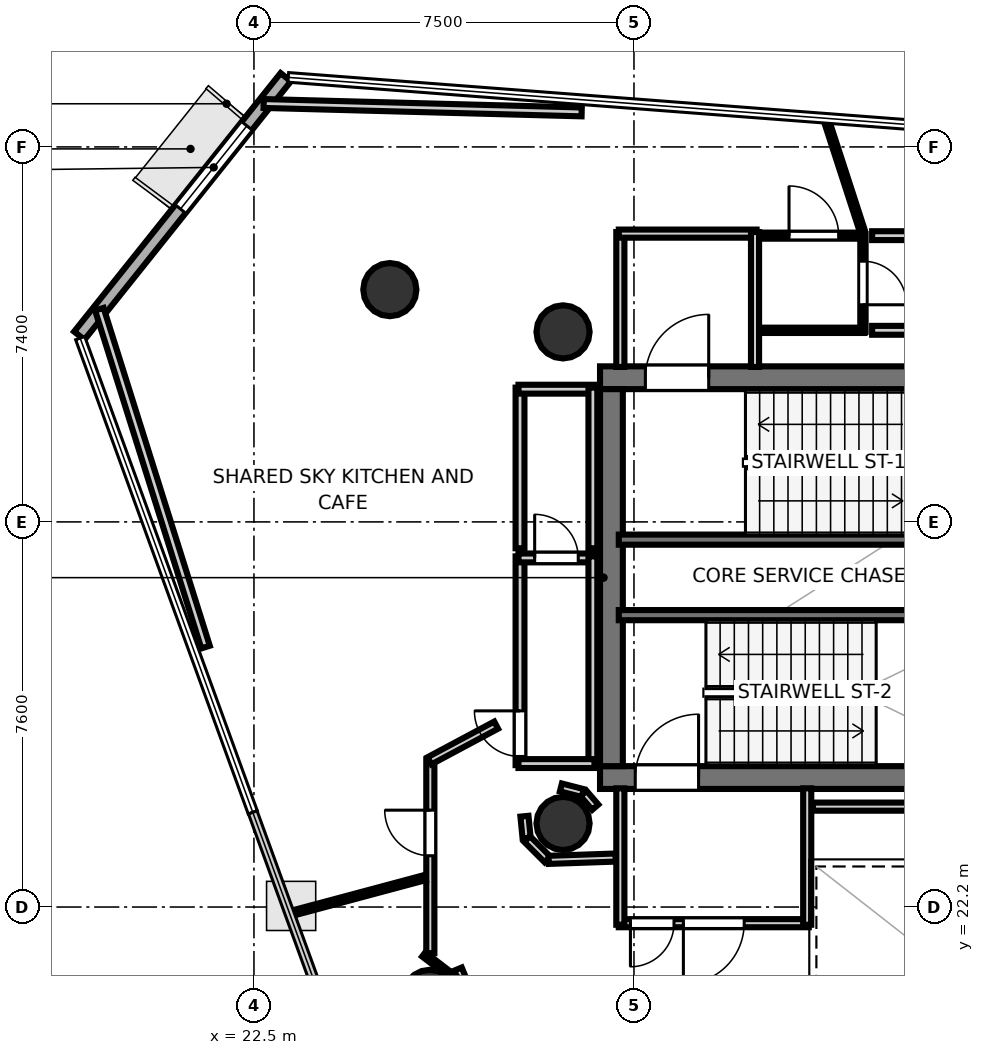
"""IFC4 building model, lengths in metres.
Left out: names, types, materials, properties, quantities, classifications, styles, units other than length and angle.
Written with IfcOpenShell. Run it as: python <this file> out.ifc"""

import sys

from ifc_helpers import new_model, si_unit, direction, frame, frame_2d, origin, origin_2d, place, context, subcontext, project, spatial, rectangle, hollow_circle, extrude, element, fill, save


model = new_model("IFC4")
c1 = context("Model", 3, precision=1e-05, world=origin(), true_north=direction((0.0, 1.0)))
c2 = subcontext(c1, "Body", "Model", "MODEL_VIEW")
j1 = project(units=[si_unit("LENGTHUNIT", "METRE"), si_unit("PLANEANGLEUNIT", "RADIAN")], contexts=[c1])
p1 = place(None, origin())
s1 = spatial("IfcSite", under=j1, at=p1, CompositionType="ELEMENT")
p2 = place(p1, origin())
s2 = spatial("IfcBuilding", under=s1, at=p2, CompositionType="ELEMENT")
p3 = place(p2, frame((0.0, 0.0, 234.5)))
s3 = spatial("IfcBuildingStorey", under=s2, at=p3, CompositionType="ELEMENT", Elevation=234.5)
p4 = place(p3, frame((29.33, 32.645, 0.0), z_axis=(0.0, 0.0, 1.0), x_axis=(1.0, 0.0, 0.0)))
e1 = element("IfcWall", 1, at=p4, inside=s3, PredefinedType="SHEAR", context=c2, shape_type="SweptSolid", body=[
    extrude(rectangle(XDim=10.52, YDim=0.45, at=frame_2d((5.26, 0.0))), origin(), (0.0, 0.0, 1.0), 4.32),
])
p5 = place(p4, frame((0.895, 0.0, 0.0)))
e2 = element("IfcOpeningElement", 2, at=p5, cuts=e1, PredefinedType="OPENING", context=c2, shape_type="SweptSolid", body=[
    extrude(rectangle(XDim=1.25, YDim=2.15, at=frame_2d((0.625, 1.075))), frame((0.0, 0.235, 0.0), z_axis=(0.0, -1.0, 0.0), x_axis=(1.0, 0.0, 0.0)), (0.0, 0.0, 1.0), 0.47),
])
p6 = place(p3, frame((29.33, 24.755, 0.0), z_axis=(0.0, 0.0, 1.0), x_axis=(1.0, 0.0, 0.0)))
e3 = element("IfcWall", 3, at=p6, inside=s3, PredefinedType="SHEAR", context=c2, shape_type="SweptSolid", body=[
    extrude(rectangle(XDim=10.52, YDim=0.45, at=frame_2d((5.26, 0.0))), origin(), (0.0, 0.0, 1.0), 4.32),
])
p7 = place(p6, frame((0.695, 0.0, 0.0)))
e4 = element("IfcOpeningElement", 4, at=p7, cuts=e3, PredefinedType="OPENING", context=c2, shape_type="SweptSolid", body=[
    extrude(rectangle(XDim=1.25, YDim=2.15, at=frame_2d((0.625, 1.075))), frame((0.0, 0.235, 0.0), z_axis=(0.0, -1.0, 0.0), x_axis=(1.0, 0.0, 0.0)), (0.0, 0.0, 1.0), 0.47),
])
p8 = place(p3, frame((29.555, 24.98, 0.0), z_axis=(0.0, 0.0, 1.0), x_axis=(0.0, 1.0, 0.0)))
e5 = element("IfcWall", 5, at=p8, inside=s3, PredefinedType="SHEAR", context=c2, shape_type="SweptSolid", body=[
    extrude(rectangle(XDim=7.44, YDim=0.45, at=frame_2d((3.72, 0.0))), origin(), (0.0, 0.0, 1.0), 4.32),
])
for number, where, z_axis, x_axis in (
    (6, (28.6, 33.55, 0.0), (0.0, 0.0, 1.0), (1.0, 0.0, 0.0)),
    (7, (28.6, 23.85, 0.0), (0.0, 0.0, 1.0), (1.0, 0.0, 0.0)),
):
    element("IfcColumn", number, at=place(p3, frame(where, z_axis=z_axis, x_axis=x_axis)), inside=s3, PredefinedType="COLUMN", context=c2, shape_type="SweptSolid", body=[
        extrude(hollow_circle(Radius=0.525, WallThickness=0.028, at=origin_2d()), origin(), (0.0, 0.0, 1.0), 4.5),
    ])
for number, where, z_axis, x_axis in (
    (8, (25.182, 34.384, -0.27), (0.0, 0.0, 1.0), (1.0, 0.0, 0.0)),
    (9, (25.972, 20.437, -0.27), (0.0, 0.0, 1.0), (1.0, 0.0, 0.0)),
):
    element("IfcColumn", number, at=place(p3, frame(where, z_axis=z_axis, x_axis=x_axis)), inside=s3, PredefinedType="COLUMN", context=c2, shape_type="SweptSolid", body=[
        extrude(hollow_circle(Radius=0.525, WallThickness=0.028, at=origin_2d()), origin(), (0.0, 0.0, 1.0), 4.77),
    ])
p9 = place(p3, frame((23.127, 38.576, 0.0), z_axis=(0.0, 0.0, 1.0), x_axis=(-0.624042741738, -0.781390207568, 0.0)))
e10 = element("IfcWall", 10, at=p9, inside=s3, PredefinedType="SOLIDWALL", context=c2, shape_type="SweptSolid", body=[
    extrude(rectangle(XDim=6.529, YDim=0.26, at=frame_2d((3.265, 0.0))), origin(), (0.0, 0.0, 1.0), 4.32),
])
p10 = place(p9, frame((1.229, 0.0, 0.85)))
e11 = element("IfcOpeningElement", 11, at=p10, cuts=e10, PredefinedType="OPENING", context=c2, shape_type="SweptSolid", body=[
    extrude(rectangle(XDim=2.1, YDim=2.2, at=frame_2d((1.05, 1.1))), frame((0.0, 0.14, 0.0), z_axis=(0.0, -1.0, 0.0), x_axis=(1.0, 0.0, 0.0)), (0.0, 0.0, 1.0), 0.28),
])
p11 = place(p3, frame((29.7, 29.45, 0.0), z_axis=(0.0, 0.0, 1.0), x_axis=(1.0, 0.0, 0.0)))
e12 = element("IfcWall", 12, at=p11, inside=s3, PredefinedType="SOLIDWALL", context=c2, shape_type="SweptSolid", body=[
    extrude(rectangle(XDim=8.3, YDim=0.2, at=frame_2d((4.15, 0.0))), origin(), (0.0, 0.0, 1.0), 4.32),
])
p12 = place(p3, frame((29.7, 27.96, 0.0), z_axis=(0.0, 0.0, 1.0), x_axis=(1.0, 0.0, 0.0)))
e13 = element("IfcWall", 13, at=p12, inside=s3, PredefinedType="SOLIDWALL", context=c2, shape_type="SweptSolid", body=[
    extrude(rectangle(XDim=7.75, YDim=0.2, at=frame_2d((3.875, 0.0))), origin(), (0.0, 0.0, 1.0), 4.32),
])
p13 = place(p3, frame((29.731, 32.858, 0.0), z_axis=(0.0, 0.0, 1.0), x_axis=(0.0, 1.0, 0.0)))
e14 = element("IfcWall", 14, at=p13, inside=s3, PredefinedType="PARTITIONING", context=c2, shape_type="SweptSolid", body=[
    extrude(rectangle(XDim=2.662, YDim=0.16, at=frame_2d((1.331, 0.0))), origin(), (0.0, 0.0, 1.0), 3.64),
])
p14 = place(p3, frame((29.7, 35.489, 0.0), z_axis=(0.0, 0.0, 1.0), x_axis=(1.0, 0.0, 0.0)))
e15 = element("IfcWall", 15, at=p14, inside=s3, PredefinedType="PARTITIONING", context=c2, shape_type="SweptSolid", body=[
    extrude(rectangle(XDim=2.72, YDim=0.16, at=frame_2d((1.36, 0.0))), origin(), (0.0, 0.0, 1.0), 3.64),
])
p15 = place(p3, frame((32.389, 35.52, 0.0), z_axis=(0.0, 0.0, 1.0), x_axis=(0.0, -1.0, 0.0)))
e16 = element("IfcWall", 16, at=p15, inside=s3, PredefinedType="PARTITIONING", context=c2, shape_type="SweptSolid", body=[
    extrude(rectangle(XDim=2.662, YDim=0.16, at=frame_2d((1.331, 0.0))), origin(), (0.0, 0.0, 1.0), 3.64),
])
p16 = place(p3, frame((33.45, 21.881, 0.0), z_axis=(0.0, 0.0, 1.0), x_axis=(-1.0, 0.0, 0.0)))
e17 = element("IfcWall", 17, at=p16, inside=s3, PredefinedType="PARTITIONING", context=c2, shape_type="SweptSolid", body=[
    extrude(rectangle(XDim=3.75, YDim=0.16, at=frame_2d((1.875, 0.0))), origin(), (0.0, 0.0, 1.0), 3.64),
])
p17 = place(p16, frame((1.275, 0.0, 0.0)))
e18 = element("IfcOpeningElement", 18, at=p17, cuts=e17, PredefinedType="OPENING", context=c2, shape_type="SweptSolid", body=[
    extrude(rectangle(XDim=1.2, YDim=2.15, at=frame_2d((0.6, 1.075))), frame((0.0, 0.09, 0.0), z_axis=(0.0, -1.0, 0.0), x_axis=(1.0, 0.0, 0.0)), (0.0, 0.0, 1.0), 0.18),
])
p18 = place(p16, frame((2.66, 0.0, 0.0)))
e19 = element("IfcOpeningElement", 19, at=p18, cuts=e17, PredefinedType="OPENING", context=c2, shape_type="SweptSolid", body=[
    extrude(rectangle(XDim=0.86, YDim=2.05, at=frame_2d((0.43, 1.025))), frame((0.0, 0.09, 0.0), z_axis=(0.0, -1.0, 0.0), x_axis=(1.0, 0.0, 0.0)), (0.0, 0.0, 1.0), 0.18),
])
for number, where, z_axis, x_axis in (
    (20, (29.731, 21.85, 0.0), (0.0, 0.0, 1.0), (0.0, 1.0, 0.0)),
    (21, (33.419, 24.542, 0.0), (0.0, 0.0, 1.0), (0.0, -1.0, 0.0)),
):
    element("IfcWall", number, at=place(p3, frame(where, z_axis=z_axis, x_axis=x_axis)), inside=s3, PredefinedType="PARTITIONING", context=c2, shape_type="SweptSolid", body=[
        extrude(rectangle(XDim=2.692, YDim=0.16, at=frame_2d((1.346, 0.0))), origin(), (0.0, 0.0, 1.0), 3.64),
    ])
p19 = place(p3, frame((34.55, 33.581, 0.0), z_axis=(0.0, 0.0, 1.0), x_axis=(-1.0, 0.0, 0.0)))
e22 = element("IfcWall", 22, at=p19, inside=s3, PredefinedType="PARTITIONING", context=c2, shape_type="SweptSolid", body=[
    extrude(rectangle(XDim=2.0, YDim=0.105, at=frame_2d((1.0, 0.0))), origin(), (0.0, 0.0, 1.0), 3.64),
])
p20 = place(p3, frame((32.55, 35.449, 0.0), z_axis=(0.0, 0.0, 1.0), x_axis=(1.0, 0.0, 0.0)))
e23 = element("IfcWall", 23, at=p20, inside=s3, PredefinedType="PARTITIONING", context=c2, shape_type="SweptSolid", body=[
    extrude(rectangle(XDim=2.0, YDim=0.12, at=frame_2d((1.0, 0.0))), origin(), (0.0, 0.0, 1.0), 3.64),
])
p21 = place(p20, frame((0.51, 0.0, 0.0)))
e24 = element("IfcOpeningElement", 24, at=p21, cuts=e23, PredefinedType="OPENING", context=c2, shape_type="SweptSolid", body=[
    extrude(rectangle(XDim=0.98, YDim=2.1, at=frame_2d((0.49, 1.05))), frame((0.0, 0.07, 0.0), z_axis=(0.0, -1.0, 0.0), x_axis=(1.0, 0.0, 0.0)), (0.0, 0.0, 1.0), 0.14),
])
p22 = place(p3, frame((34.519, 35.48, 0.0), z_axis=(0.0, 0.0, 1.0), x_axis=(0.0, -1.0, 0.0)))
e25 = element("IfcWall", 25, at=p22, inside=s3, PredefinedType="PARTITIONING", context=c2, shape_type="SweptSolid", body=[
    extrude(rectangle(XDim=1.93, YDim=0.105, at=frame_2d((0.965, 0.0))), origin(), (0.0, 0.0, 1.0), 3.64),
])
p23 = place(p22, frame((0.535, 0.0, 0.0)))
e26 = element("IfcOpeningElement", 26, at=p23, cuts=e25, PredefinedType="OPENING", context=c2, shape_type="SweptSolid", body=[
    extrude(rectangle(XDim=0.86, YDim=2.05, at=frame_2d((0.43, 1.025))), frame((0.0, 0.062, 0.0), z_axis=(0.0, -1.0, 0.0), x_axis=(1.0, 0.0, 0.0)), (0.0, 0.0, 1.0), 0.125),
])
for number, where, z_axis, x_axis in (
    (27, (37.05, 33.581, 0.0), (0.0, 0.0, 1.0), (-1.0, 0.0, 0.0)),
    (28, (34.7, 35.449, 0.0), (0.0, 0.0, 1.0), (1.0, 0.0, 0.0)),
):
    element("IfcWall", number, at=place(p3, frame(where, z_axis=z_axis, x_axis=x_axis)), inside=s3, PredefinedType="PLUMBINGWALL", context=c2, shape_type="SweptSolid", body=[
        extrude(rectangle(XDim=2.35, YDim=0.175, at=frame_2d((1.175, 0.0))), origin(), (0.0, 0.0, 1.0), 3.64),
    ])
p24 = place(p3, frame((27.751, 25.0, 0.0), z_axis=(0.0, 0.0, 1.0), x_axis=(0.0, 1.0, 0.0)))
e29 = element("IfcWall", 29, at=p24, inside=s3, PredefinedType="PLUMBINGWALL", context=c2, shape_type="SweptSolid", body=[
    extrude(rectangle(XDim=4.12, YDim=0.175, at=frame_2d((2.06, 0.0))), origin(), (0.0, 0.0, 1.0), 3.64),
])
p25 = place(p24, frame((0.171, 0.0, 0.0)))
e30 = element("IfcOpeningElement", 30, at=p25, cuts=e29, PredefinedType="OPENING", context=c2, shape_type="SweptSolid", body=[
    extrude(rectangle(XDim=0.9, YDim=2.1, at=frame_2d((0.45, 1.05))), frame((0.0, 0.097, 0.0), z_axis=(0.0, -1.0, 0.0), x_axis=(1.0, 0.0, 0.0)), (0.0, 0.0, 1.0), 0.195),
])
p26 = place(p3, frame((27.72, 29.089, 0.0), z_axis=(0.0, 0.0, 1.0), x_axis=(1.0, 0.0, 0.0)))
e31 = element("IfcWall", 31, at=p26, inside=s3, PredefinedType="PLUMBINGWALL", context=c2, shape_type="SweptSolid", body=[
    extrude(rectangle(XDim=1.5, YDim=0.175, at=frame_2d((0.75, 0.0))), origin(), (0.0, 0.0, 1.0), 3.64),
])
p27 = place(p26, frame((0.32, 0.0, 0.0)))
e32 = element("IfcOpeningElement", 32, at=p27, cuts=e31, PredefinedType="OPENING", context=c2, shape_type="SweptSolid", body=[
    extrude(rectangle(XDim=0.86, YDim=2.05, at=frame_2d((0.43, 1.025))), frame((0.0, 0.097, 0.0), z_axis=(0.0, -1.0, 0.0), x_axis=(1.0, 0.0, 0.0)), (0.0, 0.0, 1.0), 0.195),
])
p28 = place(p3, frame((29.189, 29.12, 0.0), z_axis=(0.0, 0.0, 1.0), x_axis=(0.0, -1.0, 0.0)))
e33 = element("IfcWall", 33, at=p28, inside=s3, PredefinedType="PLUMBINGWALL", context=c2, shape_type="SweptSolid", body=[
    extrude(rectangle(XDim=4.12, YDim=0.175, at=frame_2d((2.06, 0.0))), origin(), (0.0, 0.0, 1.0), 3.64),
])
p29 = place(p3, frame((29.22, 25.031, 0.0), z_axis=(0.0, 0.0, 1.0), x_axis=(-1.0, 0.0, 0.0)))
e34 = element("IfcWall", 34, at=p29, inside=s3, PredefinedType="PLUMBINGWALL", context=c2, shape_type="SweptSolid", body=[
    extrude(rectangle(XDim=1.5, YDim=0.175, at=frame_2d((0.75, 0.0))), origin(), (0.0, 0.0, 1.0), 3.64),
])
p30 = place(p3, frame((27.751, 29.28, 0.0), z_axis=(0.0, 0.0, 1.0), x_axis=(0.0, 1.0, 0.0)))
e35 = element("IfcWall", 35, at=p30, inside=s3, PredefinedType="PLUMBINGWALL", context=c2, shape_type="SweptSolid", body=[
    extrude(rectangle(XDim=3.17, YDim=0.175, at=frame_2d((1.585, 0.0))), origin(), (0.0, 0.0, 1.0), 3.64),
])
p31 = place(p3, frame((27.72, 32.419, 0.0), z_axis=(0.0, 0.0, 1.0), x_axis=(1.0, 0.0, 0.0)))
e36 = element("IfcWall", 36, at=p31, inside=s3, PredefinedType="PLUMBINGWALL", context=c2, shape_type="SweptSolid", body=[
    extrude(rectangle(XDim=1.5, YDim=0.175, at=frame_2d((0.75, 0.0))), origin(), (0.0, 0.0, 1.0), 3.64),
])
p32 = place(p3, frame((29.189, 32.45, 0.0), z_axis=(0.0, 0.0, 1.0), x_axis=(0.0, -1.0, 0.0)))
e37 = element("IfcWall", 37, at=p32, inside=s3, PredefinedType="PLUMBINGWALL", context=c2, shape_type="SweptSolid", body=[
    extrude(rectangle(XDim=3.17, YDim=0.175, at=frame_2d((1.585, 0.0))), origin(), (0.0, 0.0, 1.0), 3.64),
])
p33 = place(p3, frame((29.236, 24.17, 0.0), z_axis=(0.0, 0.0, 1.0), x_axis=(-0.652260263346, 0.757995084984, 0.0)))
e38 = element("IfcWall", 38, at=p33, inside=s3, PredefinedType="PARTITIONING", context=c2, shape_type="SweptSolid", body=[
    extrude(rectangle(XDim=0.355, YDim=0.16, at=frame_2d((0.178, 0.0))), origin(), (0.0, 0.0, 1.0), 3.64),
])
p34 = place(p3, frame((28.988, 24.45, 0.0), z_axis=(0.0, 0.0, 1.0), x_axis=(-0.968704505916, 0.248216800836, 0.0)))
e39 = element("IfcWall", 39, at=p34, inside=s3, PredefinedType="PARTITIONING", context=c2, shape_type="SweptSolid", body=[
    extrude(rectangle(XDim=0.445, YDim=0.16, at=frame_2d((0.222, 0.0))), origin(), (0.0, 0.0, 1.0), 3.64),
])
p35 = place(p3, frame((37.787, 24.181, 0.0), z_axis=(0.0, 0.0, 1.0), x_axis=(-1.0, 0.0, 0.0)))
e40 = element("IfcWall", 40, at=p35, inside=s3, PredefinedType="PARTITIONING", context=c2, shape_type="SweptSolid", body=[
    extrude(rectangle(XDim=4.257, YDim=0.16, at=frame_2d((2.129, 0.0))), origin(), (0.0, 0.0, 1.0), 3.64),
])
p36 = place(p3, frame((27.838, 23.992, 0.0), z_axis=(0.0, 0.0, 1.0), x_axis=(0.098273407977, -0.995159453196, 0.0)))
e41 = element("IfcWall", 41, at=p36, inside=s3, PredefinedType="PARTITIONING", context=c2, shape_type="SweptSolid", body=[
    extrude(rectangle(XDim=0.432, YDim=0.16, at=frame_2d((0.216, 0.0))), origin(), (0.0, 0.0, 1.0), 3.64),
])
p37 = place(p3, frame((27.89, 23.543, 0.0), z_axis=(0.0, 0.0, 1.0), x_axis=(0.707106781187, -0.707106781187, 0.0)))
e42 = element("IfcWall", 42, at=p37, inside=s3, PredefinedType="PARTITIONING", context=c2, shape_type="SweptSolid", body=[
    extrude(rectangle(XDim=0.57, YDim=0.16, at=frame_2d((0.285, 0.0))), origin(), (0.0, 0.0, 1.0), 3.64),
])
p38 = place(p3, frame((28.316, 23.131, 0.0), z_axis=(0.0, 0.0, 1.0), x_axis=(0.999405342193, 0.034481328227, 0.0)))
e43 = element("IfcWall", 43, at=p38, inside=s3, PredefinedType="PARTITIONING", context=c2, shape_type="SweptSolid", body=[
    extrude(rectangle(XDim=1.324, YDim=0.16, at=frame_2d((0.662, 0.0))), origin(), (0.0, 0.0, 1.0), 3.64),
])
p39 = place(p3, frame((26.746, 20.449, 0.0), z_axis=(0.0, 0.0, 1.0), x_axis=(-0.382881317414, 0.923797541009, 0.0)))
e44 = element("IfcWall", 44, at=p39, inside=s3, PredefinedType="PARTITIONING", context=c2, shape_type="SweptSolid", body=[
    extrude(rectangle(XDim=0.57, YDim=0.16, at=frame_2d((0.285, 0.0))), origin(), (0.0, 0.0, 1.0), 3.64),
])
p40 = place(p3, frame((25.981, 21.289, 0.0), z_axis=(0.0, 0.0, 1.0), x_axis=(0.0, 1.0, 0.0)))
e45 = element("IfcWall", 45, at=p40, inside=s3, PredefinedType="PARTITIONING", context=c2, shape_type="SweptSolid", body=[
    extrude(rectangle(XDim=3.824, YDim=0.16, at=frame_2d((1.912, 0.0))), origin(), (0.0, 0.0, 1.0), 3.64),
])
p41 = place(p40, frame((1.922, 0.0, 0.0)))
e46 = element("IfcOpeningElement", 46, at=p41, cuts=e45, PredefinedType="OPENING", context=c2, shape_type="SweptSolid", body=[
    extrude(rectangle(XDim=0.9, YDim=2.1, at=frame_2d((0.45, 1.05))), frame((0.0, 0.09, 0.0), z_axis=(0.0, -1.0, 0.0), x_axis=(1.0, 0.0, 0.0)), (0.0, 0.0, 1.0), 0.18),
])
p42 = place(p3, frame((25.965, 25.086, 0.0), z_axis=(0.0, 0.0, 1.0), x_axis=(0.881881208279, 0.471471668803, 0.0)))
e47 = element("IfcWall", 47, at=p42, inside=s3, PredefinedType="PARTITIONING", context=c2, shape_type="SweptSolid", body=[
    extrude(rectangle(XDim=1.491, YDim=0.16, at=frame_2d((0.746, 0.0))), origin(), (0.0, 0.0, 1.0), 3.64),
])
p43 = place(p3, frame((25.851, 21.265, 0.0), z_axis=(0.0, 0.0, 1.0), x_axis=(0.793898208532, -0.608050684145, 0.0)))
e48 = element("IfcWall", 48, at=p43, inside=s3, PredefinedType="PARTITIONING", context=c2, shape_type="SweptSolid", body=[
    extrude(rectangle(XDim=0.875, YDim=0.105, at=frame_2d((0.438, 0.0))), origin(), (0.0, 0.0, 1.0), 3.64),
])
p44 = place(p3, frame((23.186, 22.06, 0.0), z_axis=(0.0, 0.0, 1.0), x_axis=(0.965928889301, 0.258807613514, 0.0)))
e49 = element("IfcWall", 49, at=p44, inside=s3, PredefinedType="PARTITIONING", context=c2, shape_type="SweptSolid", body=[
    extrude(rectangle(XDim=2.787, YDim=0.105, at=frame_2d((1.393, 0.0))), origin(), (0.0, 0.0, 1.0), 3.64),
])
p45 = place(p3, frame((34.497, 35.57, 0.0), z_axis=(0.0, 0.0, 1.0), x_axis=(-0.308984127741, 0.951067194684, 0.0)))
e50 = element("IfcWall", 50, at=p45, inside=s3, PredefinedType="PARTITIONING", context=c2, shape_type="SweptSolid", body=[
    extrude(rectangle(XDim=2.329, YDim=0.105, at=frame_2d((1.164, 0.0))), origin(), (0.0, 0.0, 1.0), 3.64),
])
p46 = place(p3, frame((21.545, 27.33, 0.0), z_axis=(0.0, 0.0, 1.0), x_axis=(-0.299855659901, 0.953984582279, 0.0)))
e51 = element("IfcWall", 51, at=p46, inside=s3, PredefinedType="PLUMBINGWALL", context=c2, shape_type="SweptSolid", body=[
    extrude(rectangle(XDim=6.99, YDim=0.175, at=frame_2d((3.495, 0.0))), origin(), (0.0, 0.0, 1.0), 3.64),
])
p47 = place(p3, frame((22.691, 38.057, 0.0), z_axis=(0.0, 0.0, 1.0), x_axis=(0.999651412304, -0.026401777936, 0.0)))
e52 = element("IfcWall", 52, at=p47, inside=s3, PredefinedType="PLUMBINGWALL", context=c2, shape_type="SweptSolid", body=[
    extrude(rectangle(XDim=6.279, YDim=0.175, at=frame_2d((3.139, 0.0))), origin(), (0.0, 0.0, 1.0), 3.64),
])
p48 = place(p5, origin())
e53 = element("IfcDoor", 53, at=p48, inside=s3, OperationType="SINGLE_SWING_RIGHT", PredefinedType="DOOR", context=c2, shape_type="SweptSolid", body=[
    extrude(rectangle(XDim=1.25, YDim=2.15, at=frame_2d((0.625, 1.075))), frame((0.0, 0.025, 0.0), z_axis=(0.0, -1.0, 0.0), x_axis=(1.0, 0.0, 0.0)), (0.0, 0.0, 1.0), 0.05),
])
fill(e2, e53)
p49 = place(p7, origin())
e54 = element("IfcDoor", 54, at=p49, inside=s3, OperationType="SINGLE_SWING_RIGHT", PredefinedType="DOOR", context=c2, shape_type="SweptSolid", body=[
    extrude(rectangle(XDim=1.25, YDim=2.15, at=frame_2d((0.625, 1.075))), frame((0.0, 0.025, 0.0), z_axis=(0.0, -1.0, 0.0), x_axis=(1.0, 0.0, 0.0)), (0.0, 0.0, 1.0), 0.05),
])
fill(e4, e54)
p50 = place(p17, origin())
e55 = element("IfcDoor", 55, at=p50, inside=s3, OperationType="SINGLE_SWING_RIGHT", PredefinedType="DOOR", context=c2, shape_type="SweptSolid", body=[
    extrude(rectangle(XDim=1.2, YDim=2.15, at=frame_2d((0.6, 1.075))), frame((0.0, 0.025, 0.0), z_axis=(0.0, -1.0, 0.0), x_axis=(1.0, 0.0, 0.0)), (0.0, 0.0, 1.0), 0.05),
])
fill(e18, e55)
p51 = place(p25, origin())
e56 = element("IfcDoor", 56, at=p51, inside=s3, OperationType="SINGLE_SWING_RIGHT", PredefinedType="DOOR", context=c2, shape_type="SweptSolid", body=[
    extrude(rectangle(XDim=0.9, YDim=2.1, at=frame_2d((0.45, 1.05))), frame((0.0, 0.025, 0.0), z_axis=(0.0, -1.0, 0.0), x_axis=(1.0, 0.0, 0.0)), (0.0, 0.0, 1.0), 0.05),
])
fill(e30, e56)
p52 = place(p27, origin())
e57 = element("IfcDoor", 57, at=p52, inside=s3, OperationType="SINGLE_SWING_LEFT", PredefinedType="DOOR", context=c2, shape_type="SweptSolid", body=[
    extrude(rectangle(XDim=0.86, YDim=2.05, at=frame_2d((0.43, 1.025))), frame((0.0, 0.025, 0.0), z_axis=(0.0, -1.0, 0.0), x_axis=(1.0, 0.0, 0.0)), (0.0, 0.0, 1.0), 0.05),
])
fill(e32, e57)
p53 = place(p18, origin())
e58 = element("IfcDoor", 58, at=p53, inside=s3, OperationType="SINGLE_SWING_RIGHT", PredefinedType="DOOR", context=c2, shape_type="SweptSolid", body=[
    extrude(rectangle(XDim=0.86, YDim=2.05, at=frame_2d((0.43, 1.025))), frame((0.0, 0.025, 0.0), z_axis=(0.0, -1.0, 0.0), x_axis=(1.0, 0.0, 0.0)), (0.0, 0.0, 1.0), 0.05),
])
fill(e19, e58)
p54 = place(p41, origin())
e59 = element("IfcDoor", 59, at=p54, inside=s3, OperationType="SINGLE_SWING_RIGHT", PredefinedType="DOOR", context=c2, shape_type="SweptSolid", body=[
    extrude(rectangle(XDim=0.9, YDim=2.1, at=frame_2d((0.45, 1.05))), frame((0.0, 0.025, 0.0), z_axis=(0.0, -1.0, 0.0), x_axis=(1.0, 0.0, 0.0)), (0.0, 0.0, 1.0), 0.05),
])
fill(e46, e59)
p55 = place(p21, origin())
e60 = element("IfcDoor", 60, at=p55, inside=s3, OperationType="SINGLE_SWING_LEFT", PredefinedType="DOOR", context=c2, shape_type="SweptSolid", body=[
    extrude(rectangle(XDim=0.98, YDim=2.1, at=frame_2d((0.49, 1.05))), frame((0.0, 0.025, 0.0), z_axis=(0.0, -1.0, 0.0), x_axis=(1.0, 0.0, 0.0)), (0.0, 0.0, 1.0), 0.05),
])
fill(e24, e60)
p56 = place(p23, origin())
e61 = element("IfcDoor", 61, at=p56, inside=s3, OperationType="SINGLE_SWING_RIGHT", PredefinedType="DOOR", context=c2, shape_type="SweptSolid", body=[
    extrude(rectangle(XDim=0.86, YDim=2.05, at=frame_2d((0.43, 1.025))), frame((0.0, 0.025, 0.0), z_axis=(0.0, -1.0, 0.0), x_axis=(1.0, 0.0, 0.0)), (0.0, 0.0, 1.0), 0.05),
])
fill(e26, e61)
p57 = place(p10, origin())
e62 = element("IfcWindow", 62, at=p57, inside=s3, PartitioningType="SINGLE_PANEL", PredefinedType="WINDOW", context=c2, shape_type="SweptSolid", body=[
    extrude(rectangle(XDim=2.1, YDim=2.2, at=frame_2d((1.05, 1.1))), frame((0.0, 0.03, 0.0), z_axis=(0.0, -1.0, 0.0), x_axis=(1.0, 0.0, 0.0)), (0.0, 0.0, 1.0), 0.06),
])
fill(e11, e62)
save(model, sys.argv[1])
